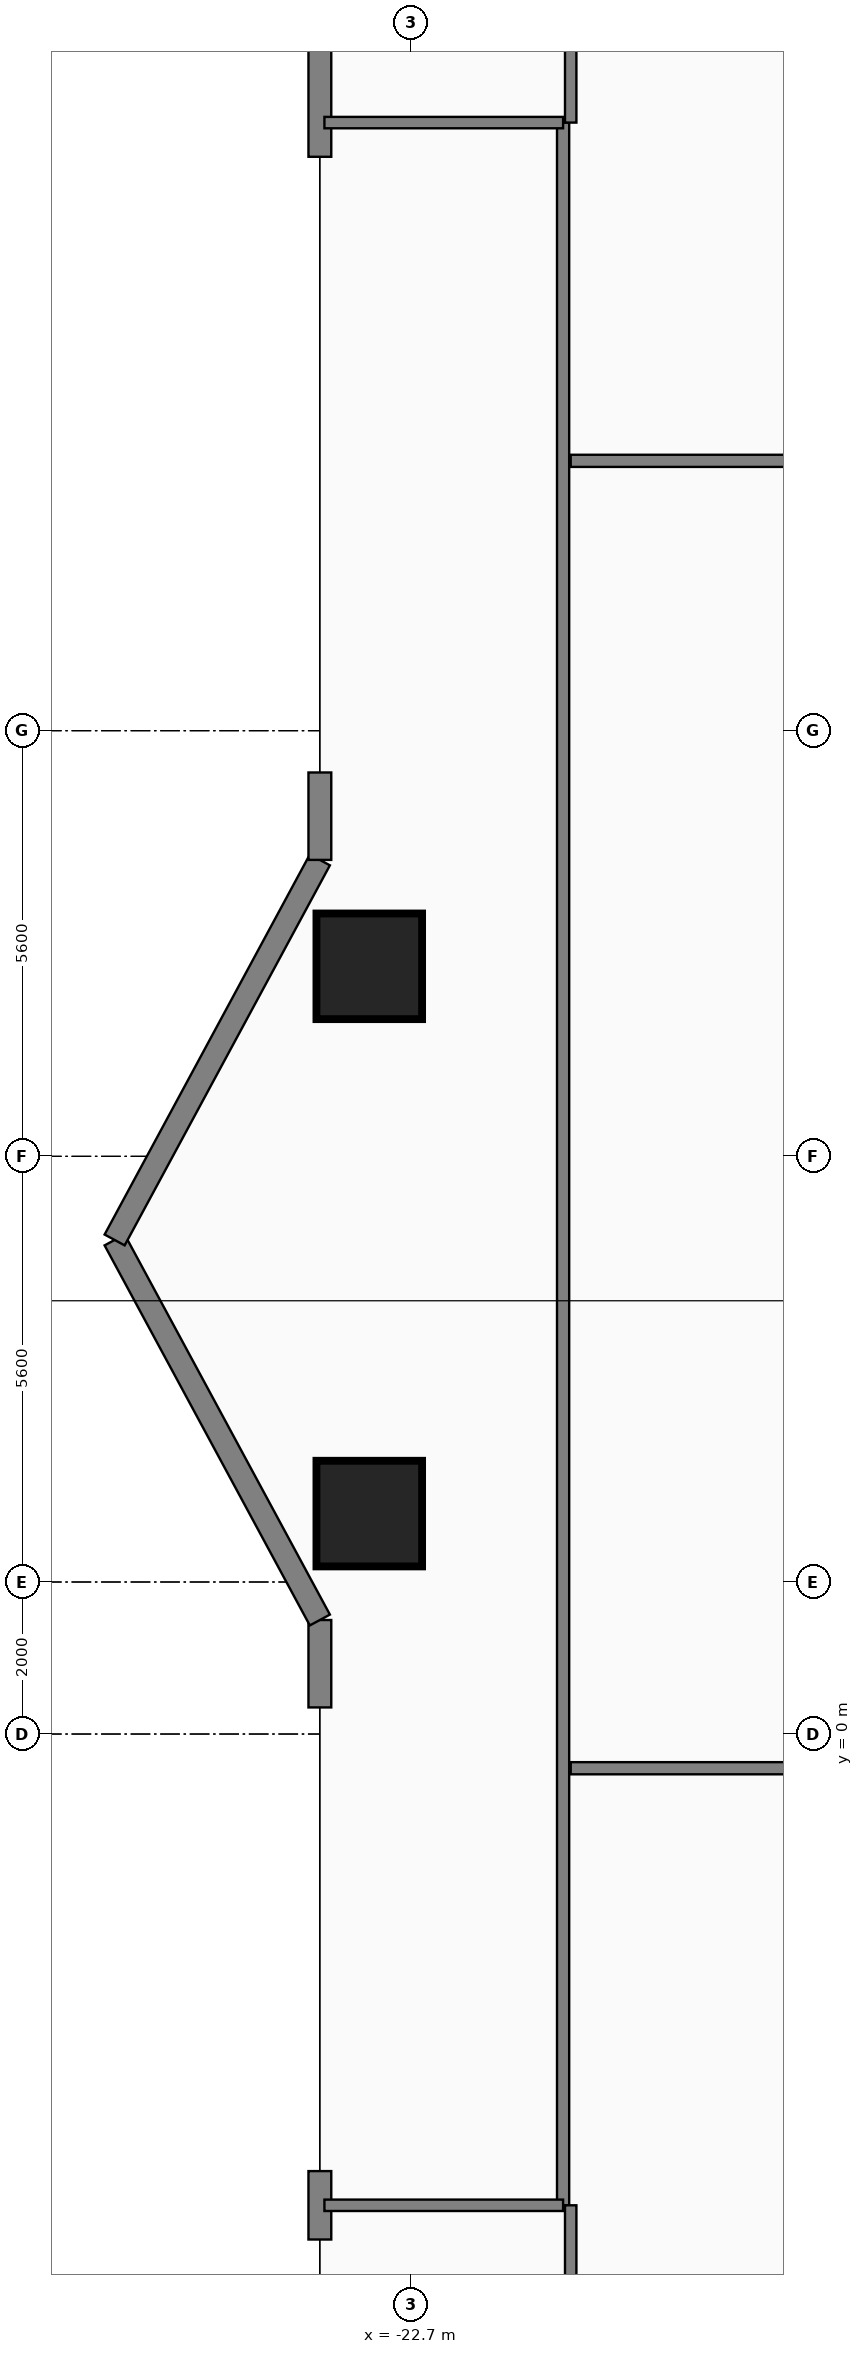
"""IFC4 building model, lengths in metres.
Left out: names, types, materials, properties, quantities, classifications, styles, units other than length and angle.
Written with IfcOpenShell. Run it as: python <this file> out.ifc"""

import sys

from ifc_helpers import new_model, si_unit, direction, frame, frame_2d, origin, origin_2d, place, context, subcontext, project, spatial, rectangle, extrude, element, fill, save


model = new_model("IFC4")
c1 = context("Model", 3, precision=1e-05, world=origin(), true_north=direction((0.0, 1.0)))
c2 = subcontext(c1, "Body", "Model", "MODEL_VIEW")
j1 = project(units=[si_unit("LENGTHUNIT", "METRE"), si_unit("PLANEANGLEUNIT", "RADIAN")], contexts=[c1])
p1 = place(None, origin())
s1 = spatial("IfcSite", under=j1, at=p1, CompositionType="ELEMENT")
p2 = place(p1, origin())
s2 = spatial("IfcBuilding", under=s1, at=p2, CompositionType="ELEMENT")
p3 = place(p2, frame((0.0, 0.0, 154.05)))
s3 = spatial("IfcBuildingStorey", under=s2, at=p3, CompositionType="ELEMENT", Elevation=154.05)
for number, where, z_axis, x_axis in (
    (1, (-23.25, 2.9, 0.0), (0.0, 0.0, 1.0), (1.0, 0.0, 0.0)),
    (2, (-23.25, 10.1, 0.0), (0.0, 0.0, 1.0), (1.0, 0.0, 0.0)),
):
    element("IfcColumn", number, at=place(p3, frame(where, z_axis=z_axis, x_axis=x_axis)), inside=s3, PredefinedType="COLUMN", context=c2, shape_type="SweptSolid", body=[
        extrude(rectangle(XDim=1.35, YDim=1.35, at=origin_2d()), origin(), (0.0, 0.0, 1.0), 4.5),
    ])
p4 = place(p3, frame((-23.9, -6.65, 0.0), z_axis=(0.0, 0.0, 1.0), x_axis=(0.0, 1.0, 0.0)))
e3 = element("IfcWall", 3, at=p4, inside=s3, PredefinedType="STANDARD", context=c2, shape_type="SweptSolid", body=[
    extrude(rectangle(XDim=0.9, YDim=0.3, at=frame_2d((0.45, 0.0))), origin(), (0.0, 0.0, 1.0), 4.28),
])
p5 = place(p3, frame((-23.9, 0.35, 0.0), z_axis=(0.0, 0.0, 1.0), x_axis=(0.0, 1.0, 0.0)))
e4 = element("IfcWall", 4, at=p5, inside=s3, PredefinedType="STANDARD", context=c2, shape_type="SweptSolid", body=[
    extrude(rectangle(XDim=1.15, YDim=0.3, at=frame_2d((0.575, 0.0))), origin(), (0.0, 0.0, 1.0), 4.28),
])
for number, where, z_axis, x_axis in (
    (5, (-23.9, 1.5, 0.0), (0.0, 0.0, 1.0), (-0.475, 0.88, 0.0)),
    (6, (-26.6, 6.5, 0.0), (0.0, 0.0, 1.0), (0.475, 0.88, 0.0)),
):
    element("IfcWall", number, at=place(p3, frame(where, z_axis=z_axis, x_axis=x_axis)), inside=s3, PredefinedType="STANDARD", context=c2, shape_type="SweptSolid", body=[
        extrude(rectangle(XDim=5.683, YDim=0.3, at=frame_2d((2.841, 0.0))), origin(), (0.0, 0.0, 1.0), 4.28),
    ])
p6 = place(p3, frame((-23.9, 11.5, 0.0), z_axis=(0.0, 0.0, 1.0), x_axis=(0.0, 1.0, 0.0)))
e7 = element("IfcWall", 7, at=p6, inside=s3, PredefinedType="STANDARD", context=c2, shape_type="SweptSolid", body=[
    extrude(rectangle(XDim=1.15, YDim=0.3, at=frame_2d((0.575, 0.0))), origin(), (0.0, 0.0, 1.0), 4.28),
])
p7 = place(p3, frame((-23.9, 20.75, 0.0), z_axis=(0.0, 0.0, 1.0), x_axis=(0.0, 1.0, 0.0)))
e8 = element("IfcWall", 8, at=p7, inside=s3, PredefinedType="STANDARD", context=c2, shape_type="SweptSolid", body=[
    extrude(rectangle(XDim=4.15, YDim=0.3, at=frame_2d((2.075, 0.0))), origin(), (0.0, 0.0, 1.0), 4.28),
])
p8 = place(p7, frame((1.44, 0.0, 0.85)))
e9 = element("IfcOpeningElement", 9, at=p8, cuts=e8, PredefinedType="OPENING", context=c2, shape_type="SweptSolid", body=[
    extrude(rectangle(XDim=1.6, YDim=1.8, at=frame_2d((0.8, 0.9))), frame((0.0, 0.16, 0.0), z_axis=(0.0, -1.0, 0.0), x_axis=(1.0, 0.0, 0.0)), (0.0, 0.0, 1.0), 0.32),
])
p9 = place(p3, frame((-20.6, 16.75, 0.0), z_axis=(0.0, 0.0, 1.0), x_axis=(1.0, 0.0, 0.0)))
e10 = element("IfcWall", 10, at=p9, inside=s3, PredefinedType="PARTITIONING", context=c2, shape_type="SweptSolid", body=[
    extrude(rectangle(XDim=18.4, YDim=0.16, at=frame_2d((9.2, 0.0))), origin(), (0.0, 0.0, 1.0), 3.823),
])
p10 = place(p9, frame((8.66, 0.0, 0.0)))
e11 = element("IfcOpeningElement", 11, at=p10, cuts=e10, PredefinedType="OPENING", context=c2, shape_type="SweptSolid", body=[
    extrude(rectangle(XDim=1.08, YDim=2.18, at=frame_2d((0.54, 1.09))), frame((0.0, 0.09, 0.0), z_axis=(0.0, -1.0, 0.0), x_axis=(1.0, 0.0, 0.0)), (0.0, 0.0, 1.0), 0.18),
])
p11 = place(p3, frame((-20.7, -6.2, 0.0), z_axis=(0.0, 0.0, 1.0), x_axis=(0.0, 1.0, 0.0)))
e12 = element("IfcWall", 12, at=p11, inside=s3, PredefinedType="PARTITIONING", context=c2, shape_type="SweptSolid", body=[
    extrude(rectangle(XDim=27.4, YDim=0.16, at=frame_2d((13.7, 0.0))), origin(), (0.0, 0.0, 1.0), 4.28),
])
p12 = place(p11, frame((13.16, 0.0, 0.0)))
e13 = element("IfcOpeningElement", 13, at=p12, cuts=e12, PredefinedType="OPENING", context=c2, shape_type="SweptSolid", body=[
    extrude(rectangle(XDim=1.08, YDim=2.18, at=frame_2d((0.54, 1.09))), frame((0.0, 0.09, 0.0), z_axis=(0.0, -1.0, 0.0), x_axis=(1.0, 0.0, 0.0)), (0.0, 0.0, 1.0), 0.18),
])
p13 = place(p3, frame((-20.6, -0.45, 0.0), z_axis=(0.0, 0.0, 1.0), x_axis=(1.0, 0.0, 0.0)))
e14 = element("IfcWall", 14, at=p13, inside=s3, PredefinedType="PARTITIONING", context=c2, shape_type="SweptSolid", body=[
    extrude(rectangle(XDim=16.7, YDim=0.16, at=frame_2d((8.35, 0.0))), origin(), (0.0, 0.0, 1.0), 4.28),
])
p14 = place(p13, frame((8.61, 0.0, 0.0)))
e15 = element("IfcOpeningElement", 15, at=p14, cuts=e14, PredefinedType="OPENING", context=c2, shape_type="SweptSolid", body=[
    extrude(rectangle(XDim=1.08, YDim=2.18, at=frame_2d((0.54, 1.09))), frame((0.0, 0.09, 0.0), z_axis=(0.0, -1.0, 0.0), x_axis=(1.0, 0.0, 0.0)), (0.0, 0.0, 1.0), 0.18),
])
p15 = place(p3, frame((-20.6, 21.2, 0.0), z_axis=(0.0, 0.0, 1.0), x_axis=(0.0, 1.0, 0.0)))
e16 = element("IfcWall", 16, at=p15, inside=s3, PredefinedType="PARTITIONING", context=c2, shape_type="SweptSolid", body=[
    extrude(rectangle(XDim=3.64, YDim=0.15, at=frame_2d((1.82, 0.0))), origin(), (0.0, 0.0, 1.0), 4.28),
])
for number, where, z_axis, x_axis in (
    (17, (-23.84, -6.2, 0.0), (0.0, 0.0, 1.0), (1.0, 0.0, 0.0)),
    (18, (-23.84, 21.2, 0.0), (0.0, 0.0, 1.0), (1.0, 0.0, 0.0)),
):
    element("IfcWall", number, at=place(p3, frame(where, z_axis=z_axis, x_axis=x_axis)), inside=s3, PredefinedType="PARTITIONING", context=c2, shape_type="SweptSolid", body=[
        extrude(rectangle(XDim=3.14, YDim=0.15, at=frame_2d((1.57, 0.0))), origin(), (0.0, 0.0, 1.0), 4.28),
    ])
p16 = place(p3, frame((-20.6, -11.84, 0.0), z_axis=(0.0, 0.0, 1.0), x_axis=(0.0, 1.0, 0.0)))
e19 = element("IfcWall", 19, at=p16, inside=s3, PredefinedType="PARTITIONING", context=c2, shape_type="SweptSolid", body=[
    extrude(rectangle(XDim=5.64, YDim=0.15, at=frame_2d((2.82, 0.0))), origin(), (0.0, 0.0, 1.0), 4.28),
])
p17 = place(p12, origin())
e20 = element("IfcDoor", 20, at=p17, inside=s3, OperationType="SINGLE_SWING_RIGHT", PredefinedType="DOOR", context=c2, shape_type="SweptSolid", body=[
    extrude(rectangle(XDim=1.08, YDim=2.18, at=frame_2d((0.54, 1.09))), frame((0.0, 0.025, 0.0), z_axis=(0.0, -1.0, 0.0), x_axis=(1.0, 0.0, 0.0)), (0.0, 0.0, 1.0), 0.05),
])
fill(e13, e20)
save(model, sys.argv[1])
